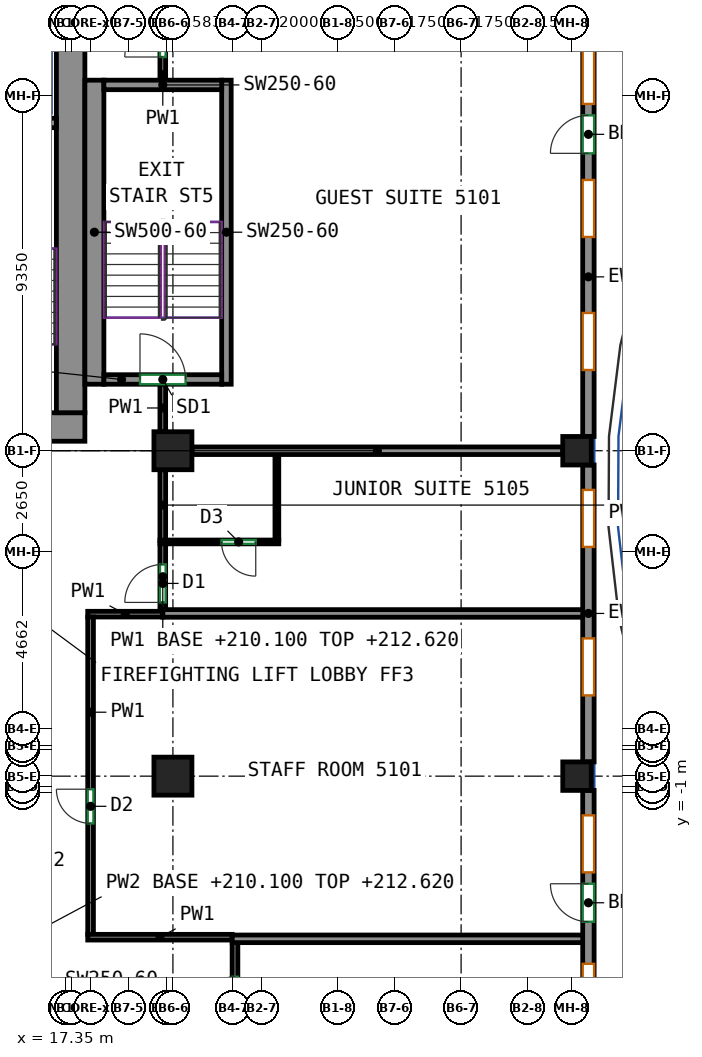
"""IFC4 building model, lengths in metres.
Left out: names, types, materials, properties, quantities, classifications, styles, units other than length and angle.
Written with IfcOpenShell. Run it as: python <this file> out.ifc"""

import sys

from ifc_helpers import new_model, si_unit, direction, frame, frame_2d, origin, origin_2d, place, context, subcontext, project, spatial, rectangle, extrude, source, transform, mapped, element, fill, save


model = new_model("IFC4")
c1 = context("Model", 3, precision=1e-05, world=origin(), true_north=direction((0.0, 1.0)))
c2 = subcontext(c1, "Body", "Model", "MODEL_VIEW")
j1 = project(units=[si_unit("LENGTHUNIT", "METRE"), si_unit("PLANEANGLEUNIT", "RADIAN")], contexts=[c1])
p1 = place(None, origin())
s1 = spatial("IfcSite", under=j1, at=p1, CompositionType="ELEMENT")
p2 = place(p1, origin())
s2 = spatial("IfcBuilding", under=s1, at=p2, CompositionType="ELEMENT")
p3 = place(p2, frame((0.0, 0.0, 210.1)))
s3 = spatial("IfcBuildingStorey", under=s2, at=p3, CompositionType="ELEMENT", Elevation=210.1)
m1 = source(origin(), c2, "Body", "SweptSolid", [
    extrude(rectangle(XDim=1.0, YDim=1.0, at=origin_2d()), origin(), (0.0, 0.0, 1.0), 3.12),
])
for number, where, z_axis, x_axis in (
    (1, (20.167, -0.562, 0.0), (0.0, 0.0, 1.0), (1.0, 0.0, 0.0)),
    (2, (20.167, 8.0, 0.0), (0.0, 0.0, 1.0), (1.0, 0.0, 0.0)),
):
    element("IfcColumn", number, at=place(p3, frame(where, z_axis=z_axis, x_axis=x_axis)), inside=s3, PredefinedType="COLUMN", context=c2, shape_type="MappedRepresentation", body=[
        mapped(m1, transform((0.0, 0.0, 0.0))),
    ])
m2 = source(origin(), c2, "Body", "SweptSolid", [
    extrude(rectangle(XDim=0.75, YDim=0.75, at=origin_2d()), origin(), (0.0, 0.0, 1.0), 3.12),
])
for number, where, z_axis, x_axis in (
    (3, (30.8, -0.562, 0.0), (0.0, 0.0, 1.0), (1.0, 0.0, 0.0)),
    (4, (30.8, 8.0, 0.0), (0.0, 0.0, 1.0), (1.0, 0.0, 0.0)),
):
    element("IfcColumn", number, at=place(p3, frame(where, z_axis=z_axis, x_axis=x_axis)), inside=s3, PredefinedType="COLUMN", context=c2, shape_type="MappedRepresentation", body=[
        mapped(m2, transform((0.0, 0.0, 0.0))),
    ])
m3 = source(origin(), c2, "Body", "SweptSolid", [
    extrude(rectangle(XDim=5.38, YDim=0.75, at=frame_2d((2.69, 0.0))), origin(), (0.0, 0.0, 1.0), 3.12),
])
p4 = place(p3, frame((12.47, 8.625, 0.0), z_axis=(0.0, 0.0, 1.0), x_axis=(1.0, 0.0, 0.0)))
e5 = element("IfcWall", 5, at=p4, inside=s3, PredefinedType="SHEAR", context=c2, shape_type="MappedRepresentation", body=[
    mapped(m3, transform((0.0, 0.0, 0.0))),
])
p5 = place(p4, frame((2.18, 0.0, 0.0)))
e6 = element("IfcOpeningElement", 6, at=p5, cuts=e5, PredefinedType="OPENING", context=c2, shape_type="SweptSolid", body=[
    extrude(rectangle(XDim=1.2, YDim=2.1, at=frame_2d((0.6, 1.05))), frame((0.0, 0.385, 0.0), z_axis=(0.0, -1.0, 0.0), x_axis=(1.0, 0.0, 0.0)), (0.0, 0.0, 1.0), 0.77),
])
m4 = source(origin(), c2, "Body", "SweptSolid", [
    extrude(rectangle(XDim=12.0, YDim=0.75, at=frame_2d((6.0, 0.0))), origin(), (0.0, 0.0, 1.0), 3.12),
])
p6 = place(p3, frame((17.475, 9.0, 0.0), z_axis=(0.0, 0.0, 1.0), x_axis=(0.0, 1.0, 0.0)))
e7 = element("IfcWall", 7, at=p6, inside=s3, PredefinedType="SHEAR", context=c2, shape_type="MappedRepresentation", body=[
    mapped(m4, transform((0.0, 0.0, 0.0))),
])
m5 = source(origin(), c2, "Body", "SweptSolid", [
    extrude(rectangle(XDim=3.7, YDim=0.25, at=frame_2d((1.85, 0.0))), origin(), (0.0, 0.0, 1.0), 3.12),
])
p7 = place(p3, frame((13.4, 16.625, 0.0), z_axis=(0.0, 0.0, 1.0), x_axis=(1.0, 0.0, 0.0)))
e8 = element("IfcWall", 8, at=p7, inside=s3, PredefinedType="SHEAR", context=c2, shape_type="MappedRepresentation", body=[
    mapped(m5, transform((0.0, 0.0, 0.0))),
])
m6 = source(origin(), c2, "Body", "SweptSolid", [
    extrude(rectangle(XDim=8.0, YDim=0.5, at=frame_2d((4.0, 0.0))), origin(), (0.0, 0.0, 1.0), 3.12),
])
p8 = place(p3, frame((18.1, 9.75, 0.0), z_axis=(0.0, 0.0, 1.0), x_axis=(0.0, 1.0, 0.0)))
e9 = element("IfcWall", 9, at=p8, inside=s3, PredefinedType="SHEAR", context=c2, shape_type="MappedRepresentation", body=[
    mapped(m6, transform((0.0, 0.0, 0.0))),
])
m7 = source(origin(), c2, "Body", "SweptSolid", [
    extrude(rectangle(XDim=8.0, YDim=0.25, at=frame_2d((4.0, 0.0))), origin(), (0.0, 0.0, 1.0), 3.12),
])
p9 = place(p3, frame((21.575, 9.75, 0.0), z_axis=(0.0, 0.0, 1.0), x_axis=(0.0, 1.0, 0.0)))
e10 = element("IfcWall", 10, at=p9, inside=s3, PredefinedType="SHEAR", context=c2, shape_type="MappedRepresentation", body=[
    mapped(m7, transform((0.0, 0.0, 0.0))),
])
m8 = source(origin(), c2, "Body", "SweptSolid", [
    extrude(rectangle(XDim=3.1, YDim=0.25, at=frame_2d((1.55, 0.0))), origin(), (0.0, 0.0, 1.0), 3.12),
])
p10 = place(p3, frame((18.35, 9.875, 0.0), z_axis=(0.0, 0.0, 1.0), x_axis=(1.0, 0.0, 0.0)))
e11 = element("IfcWall", 11, at=p10, inside=s3, PredefinedType="SHEAR", context=c2, shape_type="MappedRepresentation", body=[
    mapped(m8, transform((0.0, 0.0, 0.0))),
])
p11 = place(p10, frame((0.95, 0.0, 0.0)))
e12 = element("IfcOpeningElement", 12, at=p11, cuts=e11, PredefinedType="OPENING", context=c2, shape_type="SweptSolid", body=[
    extrude(rectangle(XDim=1.2, YDim=2.1, at=frame_2d((0.6, 1.05))), frame((0.0, 0.135, 0.0), z_axis=(0.0, -1.0, 0.0), x_axis=(1.0, 0.0, 0.0)), (0.0, 0.0, 1.0), 0.27),
])
p12 = place(p3, frame((18.35, 17.625, 0.0), z_axis=(0.0, 0.0, 1.0), x_axis=(1.0, 0.0, 0.0)))
e13 = element("IfcWall", 13, at=p12, inside=s3, PredefinedType="SHEAR", context=c2, shape_type="MappedRepresentation", body=[
    mapped(m8, transform((0.0, 0.0, 0.0))),
])
m9 = source(origin(), c2, "Body", "SweptSolid", [
    extrude(rectangle(XDim=7.812, YDim=0.3, at=frame_2d((3.906, 0.0))), origin(), (0.0, 0.0, 1.0), 3.12),
])
p13 = place(p3, frame((31.1, -8.75, 0.0), z_axis=(0.0, 0.0, 1.0), x_axis=(0.0, 1.0, 0.0)))
e14 = element("IfcWall", 14, at=p13, inside=s3, PredefinedType="SOLIDWALL", context=c2, shape_type="MappedRepresentation", body=[
    mapped(m9, transform((0.0, 0.0, 0.0))),
])
p14 = place(p13, frame((1.75, 0.0, 0.85)))
e15 = element("IfcOpeningElement", 15, at=p14, cuts=e14, PredefinedType="OPENING", context=c2, shape_type="SweptSolid", body=[
    extrude(rectangle(XDim=1.5, YDim=1.95, at=frame_2d((0.75, 0.975))), frame((0.0, 0.16, 0.0), z_axis=(0.0, -1.0, 0.0), x_axis=(1.0, 0.0, 0.0)), (0.0, 0.0, 1.0), 0.32),
])
p15 = place(p13, frame((0.45, 0.0, 0.0)))
e16 = element("IfcOpeningElement", 16, at=p15, cuts=e14, PredefinedType="OPENING", context=c2, shape_type="SweptSolid", body=[
    extrude(rectangle(XDim=1.0, YDim=2.1, at=frame_2d((0.5, 1.05))), frame((0.0, 0.16, 0.0), z_axis=(0.0, -1.0, 0.0), x_axis=(1.0, 0.0, 0.0)), (0.0, 0.0, 1.0), 0.32),
])
p16 = place(p13, frame((5.656, 0.0, 0.85)))
e17 = element("IfcOpeningElement", 17, at=p16, cuts=e14, PredefinedType="OPENING", context=c2, shape_type="SweptSolid", body=[
    extrude(rectangle(XDim=1.5, YDim=1.95, at=frame_2d((0.75, 0.975))), frame((0.0, 0.16, 0.0), z_axis=(0.0, -1.0, 0.0), x_axis=(1.0, 0.0, 0.0)), (0.0, 0.0, 1.0), 0.32),
])
p17 = place(p13, frame((4.356, 0.0, 0.0)))
e18 = element("IfcOpeningElement", 18, at=p17, cuts=e14, PredefinedType="OPENING", context=c2, shape_type="SweptSolid", body=[
    extrude(rectangle(XDim=1.0, YDim=2.1, at=frame_2d((0.5, 1.05))), frame((0.0, 0.16, 0.0), z_axis=(0.0, -1.0, 0.0), x_axis=(1.0, 0.0, 0.0)), (0.0, 0.0, 1.0), 0.32),
])
p18 = place(p3, frame((31.1, -0.188, 0.0), z_axis=(0.0, 0.0, 1.0), x_axis=(0.0, 1.0, 0.0)))
e19 = element("IfcWall", 19, at=p18, inside=s3, PredefinedType="SOLIDWALL", context=c2, shape_type="MappedRepresentation", body=[
    mapped(m9, transform((0.0, 0.0, 0.0))),
])
p19 = place(p18, frame((1.75, 0.0, 0.85)))
e20 = element("IfcOpeningElement", 20, at=p19, cuts=e19, PredefinedType="OPENING", context=c2, shape_type="SweptSolid", body=[
    extrude(rectangle(XDim=1.5, YDim=1.95, at=frame_2d((0.75, 0.975))), frame((0.0, 0.16, 0.0), z_axis=(0.0, -1.0, 0.0), x_axis=(1.0, 0.0, 0.0)), (0.0, 0.0, 1.0), 0.32),
])
p20 = place(p18, frame((5.656, 0.0, 0.85)))
e21 = element("IfcOpeningElement", 21, at=p20, cuts=e19, PredefinedType="OPENING", context=c2, shape_type="SweptSolid", body=[
    extrude(rectangle(XDim=1.5, YDim=1.95, at=frame_2d((0.75, 0.975))), frame((0.0, 0.16, 0.0), z_axis=(0.0, -1.0, 0.0), x_axis=(1.0, 0.0, 0.0)), (0.0, 0.0, 1.0), 0.32),
])
m10 = source(origin(), c2, "Body", "SweptSolid", [
    extrude(rectangle(XDim=14.0, YDim=0.3, at=frame_2d((7.0, 0.0))), origin(), (0.0, 0.0, 1.0), 3.12),
])
p21 = place(p3, frame((31.1, 8.375, 0.0), z_axis=(0.0, 0.0, 1.0), x_axis=(0.0, 1.0, 0.0)))
e22 = element("IfcWall", 22, at=p21, inside=s3, PredefinedType="SOLIDWALL", context=c2, shape_type="MappedRepresentation", body=[
    mapped(m10, transform((0.0, 0.0, 0.0))),
])
p22 = place(p21, frame((1.75, 0.0, 0.85)))
e23 = element("IfcOpeningElement", 23, at=p22, cuts=e22, PredefinedType="OPENING", context=c2, shape_type="SweptSolid", body=[
    extrude(rectangle(XDim=1.5, YDim=1.95, at=frame_2d((0.75, 0.975))), frame((0.0, 0.16, 0.0), z_axis=(0.0, -1.0, 0.0), x_axis=(1.0, 0.0, 0.0)), (0.0, 0.0, 1.0), 0.32),
])
p23 = place(p21, frame((5.25, 0.0, 0.85)))
e24 = element("IfcOpeningElement", 24, at=p23, cuts=e22, PredefinedType="OPENING", context=c2, shape_type="SweptSolid", body=[
    extrude(rectangle(XDim=1.5, YDim=1.95, at=frame_2d((0.75, 0.975))), frame((0.0, 0.16, 0.0), z_axis=(0.0, -1.0, 0.0), x_axis=(1.0, 0.0, 0.0)), (0.0, 0.0, 1.0), 0.32),
])
p24 = place(p21, frame((8.75, 0.0, 0.85)))
e25 = element("IfcOpeningElement", 25, at=p24, cuts=e22, PredefinedType="OPENING", context=c2, shape_type="SweptSolid", body=[
    extrude(rectangle(XDim=1.5, YDim=1.95, at=frame_2d((0.75, 0.975))), frame((0.0, 0.16, 0.0), z_axis=(0.0, -1.0, 0.0), x_axis=(1.0, 0.0, 0.0)), (0.0, 0.0, 1.0), 0.32),
])
p25 = place(p21, frame((7.45, 0.0, 0.0)))
e26 = element("IfcOpeningElement", 26, at=p25, cuts=e22, PredefinedType="OPENING", context=c2, shape_type="SweptSolid", body=[
    extrude(rectangle(XDim=1.0, YDim=2.1, at=frame_2d((0.5, 1.05))), frame((0.0, 0.16, 0.0), z_axis=(0.0, -1.0, 0.0), x_axis=(1.0, 0.0, 0.0)), (0.0, 0.0, 1.0), 0.32),
])
p26 = place(p21, frame((12.25, 0.0, 0.85)))
e27 = element("IfcOpeningElement", 27, at=p26, cuts=e22, PredefinedType="OPENING", context=c2, shape_type="SweptSolid", body=[
    extrude(rectangle(XDim=1.5, YDim=1.95, at=frame_2d((0.75, 0.975))), frame((0.0, 0.16, 0.0), z_axis=(0.0, -1.0, 0.0), x_axis=(1.0, 0.0, 0.0)), (0.0, 0.0, 1.0), 0.32),
])
p27 = place(p21, frame((10.95, 0.0, 0.0)))
e28 = element("IfcOpeningElement", 28, at=p27, cuts=e22, PredefinedType="OPENING", context=c2, shape_type="SweptSolid", body=[
    extrude(rectangle(XDim=1.0, YDim=2.1, at=frame_2d((0.5, 1.05))), frame((0.0, 0.16, 0.0), z_axis=(0.0, -1.0, 0.0), x_axis=(1.0, 0.0, 0.0)), (0.0, 0.0, 1.0), 0.32),
])
p28 = place(p3, frame((19.9, 3.809, 0.0), z_axis=(0.0, 0.0, 1.0), x_axis=(0.0, 1.0, 0.0)))
e29 = element("IfcWall", 29, at=p28, inside=s3, PredefinedType="PARTITIONING", context=c2, shape_type="SweptSolid", body=[
    extrude(rectangle(XDim=1.751, YDim=0.15, at=frame_2d((0.875, 0.0))), origin(), (0.0, 0.0, 1.0), 2.52),
])
p29 = place(p28, frame((0.2, 0.0, 0.0)))
e30 = element("IfcOpeningElement", 30, at=p29, cuts=e29, PredefinedType="OPENING", context=c2, shape_type="SweptSolid", body=[
    extrude(rectangle(XDim=1.0, YDim=2.1, at=frame_2d((0.5, 1.05))), frame((0.0, 0.085, 0.0), z_axis=(0.0, -1.0, 0.0), x_axis=(1.0, 0.0, 0.0)), (0.0, 0.0, 1.0), 0.17),
])
p30 = place(p3, frame((19.9, 5.64, 0.0), z_axis=(0.0, 0.0, 1.0), x_axis=(0.0, 1.0, 0.0)))
e31 = element("IfcWall", 31, at=p30, inside=s3, PredefinedType="PARTITIONING", context=c2, shape_type="SweptSolid", body=[
    extrude(rectangle(XDim=1.86, YDim=0.15, at=frame_2d((0.93, 0.0))), origin(), (0.0, 0.0, 1.0), 2.52),
])
p31 = place(p3, frame((19.9, 17.75, 0.0), z_axis=(0.0, 0.0, 1.0), x_axis=(0.0, 1.0, 0.0)))
e32 = element("IfcWall", 32, at=p31, inside=s3, PredefinedType="PARTITIONING", context=c2, shape_type="SweptSolid", body=[
    extrude(rectangle(XDim=1.81, YDim=0.15, at=frame_2d((0.905, 0.0))), origin(), (0.0, 0.0, 1.0), 3.12),
])
p32 = place(p31, frame((0.61, 0.0, 0.0)))
e33 = element("IfcOpeningElement", 33, at=p32, cuts=e32, PredefinedType="OPENING", context=c2, shape_type="SweptSolid", body=[
    extrude(rectangle(XDim=1.0, YDim=2.1, at=frame_2d((0.5, 1.05))), frame((0.0, 0.085, 0.0), z_axis=(0.0, -1.0, 0.0), x_axis=(1.0, 0.0, 0.0)), (0.0, 0.0, 1.0), 0.17),
])
p33 = place(p3, frame((19.9, 8.5, 0.0), z_axis=(0.0, 0.0, 1.0), x_axis=(0.0, 1.0, 0.0)))
e34 = element("IfcWall", 34, at=p33, inside=s3, PredefinedType="PARTITIONING", context=c2, shape_type="SweptSolid", body=[
    extrude(rectangle(XDim=1.25, YDim=0.15, at=frame_2d((0.625, 0.0))), origin(), (0.0, 0.0, 1.0), 3.12),
])
p34 = place(p3, frame((17.925, 3.7, 0.0), z_axis=(0.0, 0.0, 1.0), x_axis=(1.0, 0.0, 0.0)))
e35 = element("IfcWall", 35, at=p34, inside=s3, PredefinedType="PARTITIONING", context=c2, shape_type="SweptSolid", body=[
    extrude(rectangle(XDim=1.975, YDim=0.15, at=frame_2d((0.987, 0.0))), origin(), (0.0, 0.0, 1.0), 3.12),
])
p35 = place(p3, frame((18.0, -4.725, 0.0), z_axis=(0.0, 0.0, 1.0), x_axis=(0.0, 1.0, 0.0)))
e36 = element("IfcWall", 36, at=p35, inside=s3, PredefinedType="PARTITIONING", context=c2, shape_type="SweptSolid", body=[
    extrude(rectangle(XDim=8.35, YDim=0.15, at=frame_2d((4.175, 0.0))), origin(), (0.0, 0.0, 1.0), 3.12),
])
p36 = place(p35, frame((2.919, 0.0, 0.0)))
e37 = element("IfcOpeningElement", 37, at=p36, cuts=e36, PredefinedType="OPENING", context=c2, shape_type="SweptSolid", body=[
    extrude(rectangle(XDim=0.9, YDim=2.1, at=frame_2d((0.45, 1.05))), frame((0.0, 0.085, 0.0), z_axis=(0.0, -1.0, 0.0), x_axis=(1.0, 0.0, 0.0)), (0.0, 0.0, 1.0), 0.17),
])
p37 = place(p3, frame((17.925, -4.8, 0.0), z_axis=(0.0, 0.0, 1.0), x_axis=(1.0, 0.0, 0.0)))
e38 = element("IfcWall", 38, at=p37, inside=s3, PredefinedType="PARTITIONING", context=c2, shape_type="SweptSolid", body=[
    extrude(rectangle(XDim=3.802, YDim=0.15, at=frame_2d((1.901, 0.0))), origin(), (0.0, 0.0, 1.0), 3.12),
])
p38 = place(p3, frame((21.8, -7.75, 0.0), z_axis=(0.0, 0.0, 1.0), x_axis=(0.0, 1.0, 0.0)))
e39 = element("IfcWall", 39, at=p38, inside=s3, PredefinedType="PARTITIONING", context=c2, shape_type="SweptSolid", body=[
    extrude(rectangle(XDim=2.817, YDim=0.15, at=frame_2d((1.408, 0.0))), origin(), (0.0, 0.0, 1.0), 3.12),
])
p39 = place(p38, frame((1.009, 0.0, 0.0)))
e40 = element("IfcOpeningElement", 40, at=p39, cuts=e39, PredefinedType="OPENING", context=c2, shape_type="SweptSolid", body=[
    extrude(rectangle(XDim=0.9, YDim=2.1, at=frame_2d((0.45, 1.05))), frame((0.0, 0.085, 0.0), z_axis=(0.0, -1.0, 0.0), x_axis=(1.0, 0.0, 0.0)), (0.0, 0.0, 1.0), 0.17),
])
p40 = place(p3, frame((22.952, 5.6, 0.0), z_axis=(0.0, 0.0, 1.0), x_axis=(-1.0, 0.0, 0.0)))
e41 = element("IfcWall", 41, at=p40, inside=s3, PredefinedType="PARTITIONING", context=c2, shape_type="SweptSolid", body=[
    extrude(rectangle(XDim=3.125, YDim=0.1, at=frame_2d((1.562, 0.0))), origin(), (0.0, 0.0, 1.0), 3.12),
])
p41 = place(p40, frame((0.606, 0.0, 0.0)))
e42 = element("IfcOpeningElement", 42, at=p41, cuts=e41, PredefinedType="OPENING", context=c2, shape_type="SweptSolid", body=[
    extrude(rectangle(XDim=0.9, YDim=2.1, at=frame_2d((0.45, 1.05))), frame((0.0, 0.06, 0.0), z_axis=(0.0, -1.0, 0.0), x_axis=(1.0, 0.0, 0.0)), (0.0, 0.0, 1.0), 0.12),
])
p42 = place(p3, frame((22.902, 5.65, 0.0), z_axis=(0.0, 0.0, 1.0), x_axis=(0.0, 1.0, 0.0)))
e43 = element("IfcWall", 43, at=p42, inside=s3, PredefinedType="PARTITIONING", context=c2, shape_type="SweptSolid", body=[
    extrude(rectangle(XDim=2.25, YDim=0.1, at=frame_2d((1.125, 0.0))), origin(), (0.0, 0.0, 1.0), 3.12),
])
p43 = place(p3, frame((19.902, 3.719, 0.0), z_axis=(0.0, 0.0, 1.0), x_axis=(1.0, 0.0, 0.0)))
e44 = element("IfcWall", 44, at=p43, inside=s3, PredefinedType="PARTITIONING", context=c2, shape_type="SweptSolid", body=[
    extrude(rectangle(XDim=11.098, YDim=0.2, at=frame_2d((5.549, 0.0))), origin(), (0.0, 0.0, 1.0), 3.12),
])
p44 = place(p3, frame((20.667, 8.0, 0.0), z_axis=(0.0, 0.0, 1.0), x_axis=(1.0, 0.0, 0.0)))
e45 = element("IfcWall", 45, at=p44, inside=s3, PredefinedType="PARTITIONING", context=c2, shape_type="SweptSolid", body=[
    extrude(rectangle(XDim=9.758, YDim=0.2, at=frame_2d((4.879, 0.0))), origin(), (0.0, 0.0, 1.0), 2.52),
])
p45 = place(p3, frame((21.727, -4.843, 0.0), z_axis=(0.0, 0.0, 1.0), x_axis=(1.0, 0.0, 0.0)))
e46 = element("IfcWall", 46, at=p45, inside=s3, PredefinedType="PARTITIONING", context=c2, shape_type="SweptSolid", body=[
    extrude(rectangle(XDim=9.273, YDim=0.2, at=frame_2d((4.636, 0.0))), origin(), (0.0, 0.0, 1.0), 3.12),
])
p46 = place(p14, origin())
e47 = element("IfcWindow", 47, at=p46, inside=s3, PartitioningType="SINGLE_PANEL", PredefinedType="WINDOW", context=c2, shape_type="SweptSolid", body=[
    extrude(rectangle(XDim=1.5, YDim=1.95, at=frame_2d((0.75, 0.975))), frame((0.0, 0.03, 0.0), z_axis=(0.0, -1.0, 0.0), x_axis=(1.0, 0.0, 0.0)), (0.0, 0.0, 1.0), 0.06),
])
fill(e15, e47)
p47 = place(p16, origin())
e48 = element("IfcWindow", 48, at=p47, inside=s3, PartitioningType="SINGLE_PANEL", PredefinedType="WINDOW", context=c2, shape_type="SweptSolid", body=[
    extrude(rectangle(XDim=1.5, YDim=1.95, at=frame_2d((0.75, 0.975))), frame((0.0, 0.03, 0.0), z_axis=(0.0, -1.0, 0.0), x_axis=(1.0, 0.0, 0.0)), (0.0, 0.0, 1.0), 0.06),
])
fill(e17, e48)
p48 = place(p17, origin())
e49 = element("IfcDoor", 49, at=p48, inside=s3, OperationType="SINGLE_SWING_RIGHT", PredefinedType="DOOR", context=c2, shape_type="SweptSolid", body=[
    extrude(rectangle(XDim=1.0, YDim=2.1, at=frame_2d((0.5, 1.05))), frame((0.0, 0.025, 0.0), z_axis=(0.0, -1.0, 0.0), x_axis=(1.0, 0.0, 0.0)), (0.0, 0.0, 1.0), 0.05),
])
fill(e18, e49)
p49 = place(p19, origin())
e50 = element("IfcWindow", 50, at=p49, inside=s3, PartitioningType="SINGLE_PANEL", PredefinedType="WINDOW", context=c2, shape_type="SweptSolid", body=[
    extrude(rectangle(XDim=1.5, YDim=1.95, at=frame_2d((0.75, 0.975))), frame((0.0, 0.03, 0.0), z_axis=(0.0, -1.0, 0.0), x_axis=(1.0, 0.0, 0.0)), (0.0, 0.0, 1.0), 0.06),
])
fill(e20, e50)
p50 = place(p20, origin())
e51 = element("IfcWindow", 51, at=p50, inside=s3, PartitioningType="SINGLE_PANEL", PredefinedType="WINDOW", context=c2, shape_type="SweptSolid", body=[
    extrude(rectangle(XDim=1.5, YDim=1.95, at=frame_2d((0.75, 0.975))), frame((0.0, 0.03, 0.0), z_axis=(0.0, -1.0, 0.0), x_axis=(1.0, 0.0, 0.0)), (0.0, 0.0, 1.0), 0.06),
])
fill(e21, e51)
p51 = place(p22, origin())
e52 = element("IfcWindow", 52, at=p51, inside=s3, PartitioningType="SINGLE_PANEL", PredefinedType="WINDOW", context=c2, shape_type="SweptSolid", body=[
    extrude(rectangle(XDim=1.5, YDim=1.95, at=frame_2d((0.75, 0.975))), frame((0.0, 0.03, 0.0), z_axis=(0.0, -1.0, 0.0), x_axis=(1.0, 0.0, 0.0)), (0.0, 0.0, 1.0), 0.06),
])
fill(e23, e52)
p52 = place(p23, origin())
e53 = element("IfcWindow", 53, at=p52, inside=s3, PartitioningType="SINGLE_PANEL", PredefinedType="WINDOW", context=c2, shape_type="SweptSolid", body=[
    extrude(rectangle(XDim=1.5, YDim=1.95, at=frame_2d((0.75, 0.975))), frame((0.0, 0.03, 0.0), z_axis=(0.0, -1.0, 0.0), x_axis=(1.0, 0.0, 0.0)), (0.0, 0.0, 1.0), 0.06),
])
fill(e24, e53)
p53 = place(p24, origin())
e54 = element("IfcWindow", 54, at=p53, inside=s3, PartitioningType="SINGLE_PANEL", PredefinedType="WINDOW", context=c2, shape_type="SweptSolid", body=[
    extrude(rectangle(XDim=1.5, YDim=1.95, at=frame_2d((0.75, 0.975))), frame((0.0, 0.03, 0.0), z_axis=(0.0, -1.0, 0.0), x_axis=(1.0, 0.0, 0.0)), (0.0, 0.0, 1.0), 0.06),
])
fill(e25, e54)
p54 = place(p25, origin())
e55 = element("IfcDoor", 55, at=p54, inside=s3, OperationType="SINGLE_SWING_LEFT", PredefinedType="DOOR", context=c2, shape_type="SweptSolid", body=[
    extrude(rectangle(XDim=1.0, YDim=2.1, at=frame_2d((0.5, 1.05))), frame((0.0, 0.025, 0.0), z_axis=(0.0, -1.0, 0.0), x_axis=(1.0, 0.0, 0.0)), (0.0, 0.0, 1.0), 0.05),
])
fill(e26, e55)
p55 = place(p11, origin())
e56 = element("IfcDoor", 56, at=p55, inside=s3, OperationType="DOUBLE_DOOR_SINGLE_SWING", PredefinedType="DOOR", context=c2, shape_type="SweptSolid", body=[
    extrude(rectangle(XDim=1.2, YDim=2.1, at=frame_2d((0.6, 1.05))), frame((0.0, 0.025, 0.0), z_axis=(0.0, -1.0, 0.0), x_axis=(1.0, 0.0, 0.0)), (0.0, 0.0, 1.0), 0.05),
])
fill(e12, e56)
p56 = place(p39, origin())
e57 = element("IfcDoor", 57, at=p56, inside=s3, OperationType="SINGLE_SWING_LEFT", PredefinedType="DOOR", context=c2, shape_type="SweptSolid", body=[
    extrude(rectangle(XDim=0.9, YDim=2.1, at=frame_2d((0.45, 1.05))), frame((0.0, 0.025, 0.0), z_axis=(0.0, -1.0, 0.0), x_axis=(1.0, 0.0, 0.0)), (0.0, 0.0, 1.0), 0.05),
])
fill(e40, e57)
p57 = place(p36, origin())
e58 = element("IfcDoor", 58, at=p57, inside=s3, OperationType="SINGLE_SWING_RIGHT", PredefinedType="DOOR", context=c2, shape_type="SweptSolid", body=[
    extrude(rectangle(XDim=0.9, YDim=2.1, at=frame_2d((0.45, 1.05))), frame((0.0, 0.025, 0.0), z_axis=(0.0, -1.0, 0.0), x_axis=(1.0, 0.0, 0.0)), (0.0, 0.0, 1.0), 0.05),
])
fill(e37, e58)
p58 = place(p29, origin())
e59 = element("IfcDoor", 59, at=p58, inside=s3, OperationType="SINGLE_SWING_LEFT", PredefinedType="DOOR", context=c2, shape_type="SweptSolid", body=[
    extrude(rectangle(XDim=1.0, YDim=2.1, at=frame_2d((0.5, 1.05))), frame((0.0, 0.025, 0.0), z_axis=(0.0, -1.0, 0.0), x_axis=(1.0, 0.0, 0.0)), (0.0, 0.0, 1.0), 0.05),
])
fill(e30, e59)
p59 = place(p41, origin())
e60 = element("IfcDoor", 60, at=p59, inside=s3, OperationType="SINGLE_SWING_LEFT", PredefinedType="DOOR", context=c2, shape_type="SweptSolid", body=[
    extrude(rectangle(XDim=0.9, YDim=2.1, at=frame_2d((0.45, 1.05))), frame((0.0, 0.025, 0.0), z_axis=(0.0, -1.0, 0.0), x_axis=(1.0, 0.0, 0.0)), (0.0, 0.0, 1.0), 0.05),
])
fill(e42, e60)
p60 = place(p32, origin())
e61 = element("IfcDoor", 61, at=p60, inside=s3, OperationType="SINGLE_SWING_LEFT", PredefinedType="DOOR", context=c2, shape_type="SweptSolid", body=[
    extrude(rectangle(XDim=1.0, YDim=2.1, at=frame_2d((0.5, 1.05))), frame((0.0, 0.025, 0.0), z_axis=(0.0, -1.0, 0.0), x_axis=(1.0, 0.0, 0.0)), (0.0, 0.0, 1.0), 0.05),
])
fill(e33, e61)
save(model, sys.argv[1])
